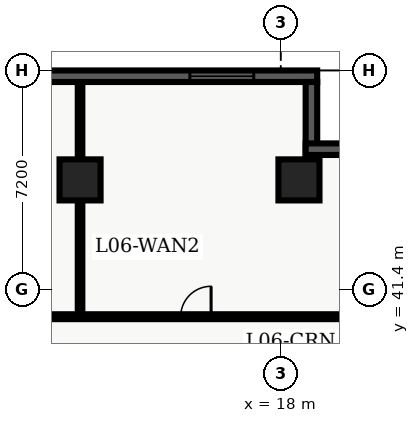
"""IFC4 building model, lengths in metres.
Left out: names, types, materials, properties, quantities, classifications, styles, units other than length and angle.
Written with IfcOpenShell. Run it as: python <this file> out.ifc"""

import sys

from ifc_helpers import new_model, entity, si_unit, converted_unit, direction, frame, origin_with_axes, origin_2d_with_axis, place, context, subcontext, project, spatial, polyline, rectangle, outline, extrude, element, fill, save


model = new_model("IFC4")
c1 = context("Model", 3, precision=1e-05, world=origin_with_axes(), true_north=direction((0.0, 1.0)))
c2 = subcontext(c1, "Body", "Model", "MODEL_VIEW")
j1 = project(units=[si_unit("LENGTHUNIT", "METRE"), converted_unit("PLANEANGLEUNIT", "DEGREE", entity("IfcPlaneAngleMeasure", 0.017), si_unit("PLANEANGLEUNIT", "RADIAN"), dimensions=[0, 0, 0, 0, 0, 0, 0])], contexts=[c1])
p1 = place(None, origin_with_axes())
s1 = spatial("IfcSite", under=j1, at=p1, CompositionType="ELEMENT")
p2 = place(p1, origin_with_axes())
s2 = spatial("IfcBuilding", under=s1, at=p2, CompositionType="ELEMENT")
p3 = place(p2, frame((0.0, 0.0, 28.8), z_axis=(0.0, 0.0, 1.0), x_axis=(1.0, 0.0, 0.0)))
s3 = spatial("IfcBuildingStorey", under=s2, at=p3, CompositionType="ELEMENT", Elevation=28.8)
for number, where, z_axis, x_axis in (
    (1, (11.4, 45.0, 0.0), (0.0, 0.0, 1.0), (1.0, 0.0, 0.0)),
    (2, (18.6, 45.0, 0.0), (0.0, 0.0, 1.0), (1.0, 0.0, 0.0)),
):
    element("IfcColumn", number, at=place(p3, frame(where, z_axis=z_axis, x_axis=x_axis)), inside=s3, PredefinedType="COLUMN", context=c2, shape_type="SweptSolid", body=[
        extrude(rectangle(XDim=1.35, YDim=1.35, at=origin_2d_with_axis()), origin_with_axes(), (0.0, 0.0, 1.0), 3.9),
    ])
p4 = place(p3, frame((2.6, 40.5, 0.0), z_axis=(0.0, 0.0, 1.0), x_axis=(1.0, 0.0, 0.0)))
e3 = element("IfcWall", 3, at=p4, inside=s3, PredefinedType="PARTITIONING", context=c2, shape_type="SweptSolid", body=[
    extrude(outline(polyline([(0.0, -0.08), (18.65, -0.08), (18.65, 0.08), (0.0, 0.08), (0.0, -0.08)])), origin_with_axes(), (0.0, 0.0, 1.0), 2.7),
])
p5 = place(p4, frame((4.395, 0.0, 0.0), z_axis=(0.0, 0.0, 1.0), x_axis=(1.0, 0.0, 0.0)))
e4 = element("IfcOpeningElement", 4, at=p5, cuts=e3, PredefinedType="OPENING", context=c2, shape_type="SweptSolid", body=[
    extrude(rectangle(XDim=1.2, YDim=0.18, at=origin_2d_with_axis()), origin_with_axes(), (0.0, 0.0, 1.0), 2.2),
])
p6 = place(p4, frame((12.61, 0.0, 0.0), z_axis=(0.0, 0.0, 1.0), x_axis=(1.0, 0.0, 0.0)))
e5 = element("IfcOpeningElement", 5, at=p6, cuts=e3, PredefinedType="OPENING", context=c2, shape_type="SweptSolid", body=[
    extrude(rectangle(XDim=1.0, YDim=0.18, at=origin_2d_with_axis()), origin_with_axes(), (0.0, 0.0, 1.0), 2.15),
])
p7 = place(p3, frame((11.4, 40.6, 0.0), z_axis=(0.0, 0.0, 1.0), x_axis=(0.0, 1.0, 0.0)))
e6 = element("IfcWall", 6, at=p7, inside=s3, PredefinedType="PARTITIONING", context=c2, shape_type="SweptSolid", body=[
    extrude(outline(polyline([(0.0, -0.075), (7.64, -0.075), (7.64, 0.075), (0.0, 0.075), (0.0, -0.075)])), origin_with_axes(), (0.0, 0.0, 1.0), 2.7),
])
p8 = place(p3, frame((2.78, 48.41, 0.0), z_axis=(0.0, 0.0, 1.0), x_axis=(1.0, 0.0, 0.0)))
e7 = element("IfcWall", 7, at=p8, inside=s3, PredefinedType="SOLIDWALL", context=c2, shape_type="SweptSolid", body=[
    extrude(outline(polyline([(0.0, -0.19), (16.42, -0.19), (16.42, 0.19), (0.0, 0.19), (0.0, -0.19)])), origin_with_axes(), (0.0, 0.0, 1.0), 3.66),
])
p9 = place(p8, frame((3.137, 0.0, 0.45), z_axis=(0.0, 0.0, 1.0), x_axis=(1.0, 0.0, 0.0)))
e8 = element("IfcOpeningElement", 8, at=p9, cuts=e7, PredefinedType="OPENING", context=c2, shape_type="SweptSolid", body=[
    extrude(rectangle(XDim=2.1, YDim=0.4, at=origin_2d_with_axis()), origin_with_axes(), (0.0, 0.0, 1.0), 2.2),
])
p10 = place(p8, frame((13.283, 0.0, 0.45), z_axis=(0.0, 0.0, 1.0), x_axis=(1.0, 0.0, 0.0)))
e9 = element("IfcOpeningElement", 9, at=p10, cuts=e7, PredefinedType="OPENING", context=c2, shape_type="SweptSolid", body=[
    extrude(rectangle(XDim=2.1, YDim=0.4, at=origin_2d_with_axis()), origin_with_axes(), (0.0, 0.0, 1.0), 2.2),
])
p11 = place(p3, frame((19.01, 48.22, 0.0), z_axis=(0.0, 0.0, 1.0), x_axis=(0.0, -1.0, 0.0)))
e10 = element("IfcWall", 10, at=p11, inside=s3, PredefinedType="SOLIDWALL", context=c2, shape_type="SweptSolid", body=[
    extrude(outline(polyline([(0.0, -0.19), (2.56, -0.19), (2.56, 0.19), (0.0, 0.19), (0.0, -0.19)])), origin_with_axes(), (0.0, 0.0, 1.0), 3.66),
])
p12 = place(p3, frame((18.82, 46.01, 0.0), z_axis=(0.0, 0.0, 1.0), x_axis=(1.0, 0.0, 0.0)))
e11 = element("IfcWall", 11, at=p12, inside=s3, PredefinedType="SOLIDWALL", context=c2, shape_type="SweptSolid", body=[
    extrude(outline(polyline([(0.0, -0.19), (2.78, -0.19), (2.78, 0.19), (0.0, 0.19), (0.0, -0.19)])), origin_with_axes(), (0.0, 0.0, 1.0), 3.66),
])
p13 = place(p4, frame((12.61, 0.0, 0.0), z_axis=(0.0, 0.0, 1.0), x_axis=(1.0, 0.0, 0.0)))
e12 = element("IfcDoor", 12, at=p13, inside=s3, OperationType="SINGLE_SWING_RIGHT", PredefinedType="DOOR", context=c2, shape_type="SweptSolid", body=[
    extrude(rectangle(XDim=1.0, YDim=0.09, at=origin_2d_with_axis()), origin_with_axes(), (0.0, 0.0, 1.0), 2.15),
])
fill(e5, e12)
p14 = place(p8, frame((13.283, 0.0, 0.45), z_axis=(0.0, 0.0, 1.0), x_axis=(1.0, 0.0, 0.0)))
e13 = element("IfcWindow", 13, at=p14, inside=s3, PredefinedType="WINDOW", context=c2, shape_type="SweptSolid", body=[
    extrude(rectangle(XDim=2.1, YDim=0.09, at=origin_2d_with_axis()), origin_with_axes(), (0.0, 0.0, 1.0), 2.2),
])
fill(e9, e13)
save(model, sys.argv[1])
